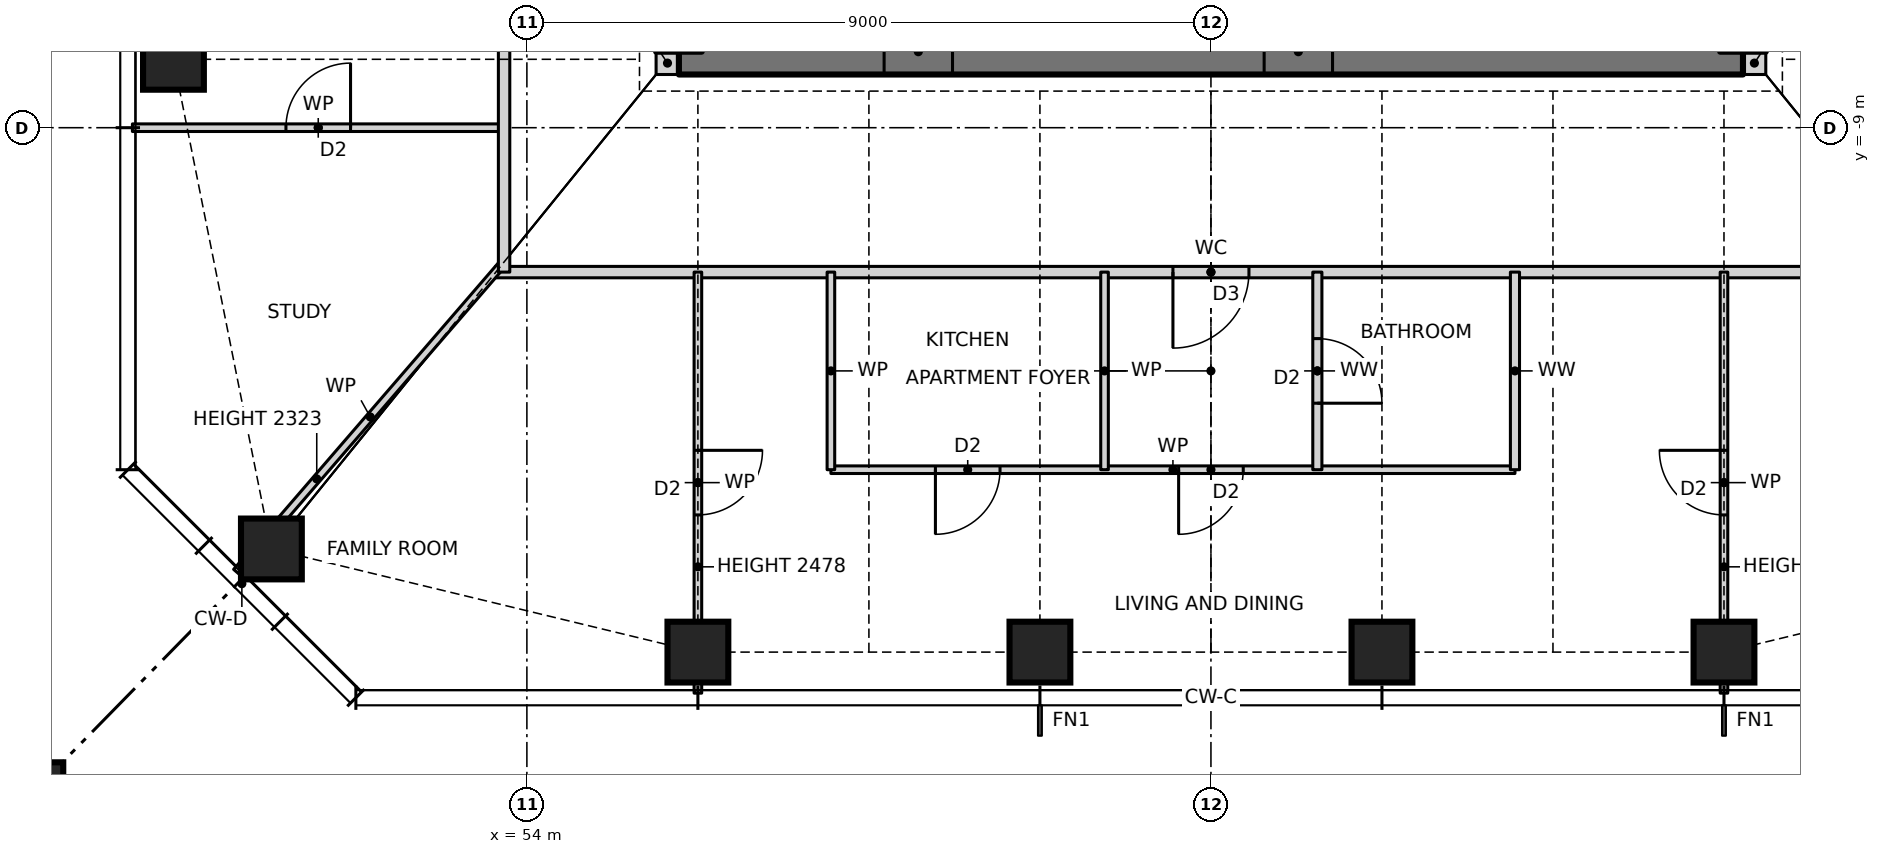
"""IFC4 building model, lengths in metres.
Left out: names, types, materials, properties, quantities, classifications, styles, units other than length and angle.
Written with IfcOpenShell. Run it as: python <this file> out.ifc"""

import sys

from ifc_helpers import new_model, si_unit, direction, frame, frame_2d, origin, origin_2d, place, context, subcontext, project, spatial, rectangle, hollow_rectangle, extrude, element, fill, save


model = new_model("IFC4")
c1 = context("Model", 3, precision=1e-05, world=origin(), true_north=direction((0.0, 1.0)))
c2 = subcontext(c1, "Body", "Model", "MODEL_VIEW")
j1 = project(units=[si_unit("LENGTHUNIT", "METRE"), si_unit("PLANEANGLEUNIT", "RADIAN")], contexts=[c1])
p1 = place(None, origin())
s1 = spatial("IfcSite", under=j1, at=p1, CompositionType="ELEMENT")
p2 = place(p1, origin())
s2 = spatial("IfcBuilding", under=s1, at=p2, CompositionType="ELEMENT")
p3 = place(p2, frame((0.0, 0.0, 126.0)))
s3 = spatial("IfcBuildingStorey", under=s2, at=p3, CompositionType="ELEMENT", Elevation=126.0)
for number, where, z_axis, x_axis in (
    (1, (50.639, -14.543, 0.0), (0.0, 0.0, 1.0), (1.0, 0.0, 0.0)),
    (2, (56.25, -15.9, 0.0), (0.0, 0.0, 1.0), (1.0, 0.0, 0.0)),
    (3, (60.75, -15.9, 0.0), (0.0, 0.0, 1.0), (1.0, 0.0, 0.0)),
    (4, (65.25, -15.9, 0.0), (0.0, 0.0, 1.0), (1.0, 0.0, 0.0)),
    (5, (69.75, -15.9, 0.0), (0.0, 0.0, 1.0), (1.0, 0.0, 0.0)),
    (6, (49.35, -8.1, 0.0), (0.0, 0.0, 1.0), (1.0, 0.0, 0.0)),
):
    element("IfcColumn", number, at=place(p3, frame(where, z_axis=z_axis, x_axis=x_axis)), inside=s3, PredefinedType="COLUMN", context=c2, shape_type="SweptSolid", body=[
        extrude(hollow_rectangle(XDim=0.8, YDim=0.8, WallThickness=0.1, at=origin_2d()), origin(), (0.0, 0.0, 1.0), 3.5),
    ])
p4 = place(p3, frame((47.35, -17.9, 0.0), z_axis=(0.0, 0.0, 1.0), x_axis=(1.0, 0.0, 0.0)))
e7 = element("IfcColumn", 7, at=p4, inside=s3, PredefinedType="COLUMN", context=c2, shape_type="SweptSolid", body=[
    extrude(hollow_rectangle(XDim=1.1, YDim=1.1, WallThickness=0.06, at=origin_2d()), origin(), (0.0, 0.0, 1.0), 3.5),
])
for number, where, z_axis, x_axis in (
    (8, (55.7, -8.15, 0.0), (0.0, 0.0, 1.0), (1.0, 0.0, 0.0)),
    (9, (70.0, -8.15, 0.0), (0.0, 0.0, 1.0), (1.0, 0.0, 0.0)),
):
    element("IfcWall", number, at=place(p3, frame(where, z_axis=z_axis, x_axis=x_axis)), inside=s3, PredefinedType="SOLIDWALL", context=c2, shape_type="SweptSolid", body=[
        extrude(rectangle(XDim=0.3, YDim=0.3, at=frame_2d((0.15, 0.0))), origin(), (0.0, 0.0, 1.0), 3.5),
    ])
p5 = place(p3, frame((56.0, -8.0, 0.0), z_axis=(0.0, 0.0, 1.0), x_axis=(1.0, 0.0, 0.0)))
e10 = element("IfcWall", 10, at=p5, inside=s3, PredefinedType="SHEAR", context=c2, shape_type="SweptSolid", body=[
    extrude(rectangle(XDim=14.0, YDim=0.6, at=frame_2d((7.0, 0.0))), origin(), (0.0, 0.0, 1.0), 3.5),
])
p6 = place(p5, frame((2.7, 0.0, 0.0)))
e11 = element("IfcOpeningElement", 11, at=p6, cuts=e10, PredefinedType="OPENING", context=c2, shape_type="SweptSolid", body=[
    extrude(rectangle(XDim=0.9, YDim=2.1, at=frame_2d((0.45, 1.05))), frame((0.0, 0.31, 0.0), z_axis=(0.0, -1.0, 0.0), x_axis=(1.0, 0.0, 0.0)), (0.0, 0.0, 1.0), 0.62),
])
p7 = place(p5, frame((7.7, 0.0, 0.0)))
e12 = element("IfcOpeningElement", 12, at=p7, cuts=e10, PredefinedType="OPENING", context=c2, shape_type="SweptSolid", body=[
    extrude(rectangle(XDim=0.9, YDim=2.1, at=frame_2d((0.45, 1.05))), frame((0.0, 0.31, 0.0), z_axis=(0.0, -1.0, 0.0), x_axis=(1.0, 0.0, 0.0)), (0.0, 0.0, 1.0), 0.62),
])
p8 = place(p3, frame((58.0, -13.5, 0.0), z_axis=(0.0, 0.0, 1.0), x_axis=(1.0, 0.0, 0.0)))
e13 = element("IfcWall", 13, at=p8, inside=s3, PredefinedType="PARTITIONING", context=c2, shape_type="SweptSolid", body=[
    extrude(rectangle(XDim=9.0, YDim=0.1, at=frame_2d((4.5, 0.0))), origin(), (0.0, 0.0, 1.0), 3.25),
])
p9 = place(p8, frame((1.375, 0.0, 0.0)))
e14 = element("IfcOpeningElement", 14, at=p9, cuts=e13, PredefinedType="OPENING", context=c2, shape_type="SweptSolid", body=[
    extrude(rectangle(XDim=0.85, YDim=2.1, at=frame_2d((0.425, 1.05))), frame((0.0, 0.06, 0.0), z_axis=(0.0, -1.0, 0.0), x_axis=(1.0, 0.0, 0.0)), (0.0, 0.0, 1.0), 0.12),
])
p10 = place(p8, frame((4.575, 0.0, 0.0)))
e15 = element("IfcOpeningElement", 15, at=p10, cuts=e13, PredefinedType="OPENING", context=c2, shape_type="SweptSolid", body=[
    extrude(rectangle(XDim=0.85, YDim=2.1, at=frame_2d((0.425, 1.05))), frame((0.0, 0.06, 0.0), z_axis=(0.0, -1.0, 0.0), x_axis=(1.0, 0.0, 0.0)), (0.0, 0.0, 1.0), 0.12),
])
p11 = place(p3, frame((53.586, -10.9, 0.0), z_axis=(0.0, 0.0, 1.0), x_axis=(1.0, 0.0, 0.0)))
e16 = element("IfcWall", 16, at=p11, inside=s3, PredefinedType="PARTITIONING", context=c2, shape_type="SweptSolid", body=[
    extrude(rectangle(XDim=18.828, YDim=0.15, at=frame_2d((9.414, 0.0))), origin(), (0.0, 0.0, 1.0), 3.25),
])
p12 = place(p11, frame((8.914, 0.0, 0.0)))
e17 = element("IfcOpeningElement", 17, at=p12, cuts=e16, PredefinedType="OPENING", context=c2, shape_type="SweptSolid", body=[
    extrude(rectangle(XDim=1.0, YDim=2.1, at=frame_2d((0.5, 1.05))), frame((0.0, 0.085, 0.0), z_axis=(0.0, -1.0, 0.0), x_axis=(1.0, 0.0, 0.0)), (0.0, 0.0, 1.0), 0.17),
])
p13 = place(p3, frame((48.81, -9.0, 0.0), z_axis=(0.0, 0.0, 1.0), x_axis=(1.0, 0.0, 0.0)))
e18 = element("IfcWall", 18, at=p13, inside=s3, PredefinedType="PARTITIONING", context=c2, shape_type="SweptSolid", body=[
    extrude(rectangle(XDim=4.89, YDim=0.1, at=frame_2d((2.445, 0.0))), origin(), (0.0, 0.0, 1.0), 3.25),
])
p14 = place(p13, frame((2.02, 0.0, 0.0)))
e19 = element("IfcOpeningElement", 19, at=p14, cuts=e18, PredefinedType="OPENING", context=c2, shape_type="SweptSolid", body=[
    extrude(rectangle(XDim=0.85, YDim=2.1, at=frame_2d((0.425, 1.05))), frame((0.0, 0.06, 0.0), z_axis=(0.0, -1.0, 0.0), x_axis=(1.0, 0.0, 0.0)), (0.0, 0.0, 1.0), 0.12),
])
p15 = place(p3, frame((50.179, -14.844, 0.0), z_axis=(0.0, 0.0, 1.0), x_axis=(0.653713095188, 0.756742485381, 0.0)))
e20 = element("IfcWall", 20, at=p15, inside=s3, PredefinedType="PARTITIONING", context=c2, shape_type="SweptSolid", body=[
    extrude(rectangle(XDim=5.386, YDim=0.1, at=frame_2d((2.693, 0.0))), origin(), (0.0, 0.0, 1.0), 2.323),
])
p16 = place(p3, frame((69.75, -16.44, 0.0), z_axis=(0.0, 0.0, 1.0), x_axis=(0.0, 1.0, 0.0)))
e21 = element("IfcWall", 21, at=p16, inside=s3, PredefinedType="PARTITIONING", context=c2, shape_type="SweptSolid", body=[
    extrude(rectangle(XDim=5.54, YDim=0.1, at=frame_2d((2.77, 0.0))), origin(), (0.0, 0.0, 1.0), 2.478),
])
p17 = place(p16, frame((2.345, 0.0, 0.0)))
e22 = element("IfcOpeningElement", 22, at=p17, cuts=e21, PredefinedType="OPENING", context=c2, shape_type="SweptSolid", body=[
    extrude(rectangle(XDim=0.85, YDim=2.1, at=frame_2d((0.425, 1.05))), frame((0.0, 0.06, 0.0), z_axis=(0.0, -1.0, 0.0), x_axis=(1.0, 0.0, 0.0)), (0.0, 0.0, 1.0), 0.12),
])
p18 = place(p3, frame((67.0, -13.5, 0.0), z_axis=(0.0, 0.0, 1.0), x_axis=(0.0, 1.0, 0.0)))
e23 = element("IfcWall", 23, at=p18, inside=s3, PredefinedType="PARTITIONING", context=c2, shape_type="SweptSolid", body=[
    extrude(rectangle(XDim=2.6, YDim=0.12, at=frame_2d((1.3, 0.0))), origin(), (0.0, 0.0, 1.0), 3.25),
])
p19 = place(p3, frame((64.4, -13.5, 0.0), z_axis=(0.0, 0.0, 1.0), x_axis=(0.0, 1.0, 0.0)))
e24 = element("IfcWall", 24, at=p19, inside=s3, PredefinedType="PARTITIONING", context=c2, shape_type="SweptSolid", body=[
    extrude(rectangle(XDim=2.6, YDim=0.12, at=frame_2d((1.3, 0.0))), origin(), (0.0, 0.0, 1.0), 3.25),
])
p20 = place(p19, frame((0.875, 0.0, 0.0)))
e25 = element("IfcOpeningElement", 25, at=p20, cuts=e24, PredefinedType="OPENING", context=c2, shape_type="SweptSolid", body=[
    extrude(rectangle(XDim=0.85, YDim=2.1, at=frame_2d((0.425, 1.05))), frame((0.0, 0.07, 0.0), z_axis=(0.0, -1.0, 0.0), x_axis=(1.0, 0.0, 0.0)), (0.0, 0.0, 1.0), 0.14),
])
for number, where, z_axis, x_axis in (
    (26, (61.6, -13.5, 0.0), (0.0, 0.0, 1.0), (0.0, 1.0, 0.0)),
    (27, (58.0, -13.5, 0.0), (0.0, 0.0, 1.0), (0.0, 1.0, 0.0)),
):
    element("IfcWall", number, at=place(p3, frame(where, z_axis=z_axis, x_axis=x_axis)), inside=s3, PredefinedType="PARTITIONING", context=c2, shape_type="SweptSolid", body=[
        extrude(rectangle(XDim=2.6, YDim=0.1, at=frame_2d((1.3, 0.0))), origin(), (0.0, 0.0, 1.0), 3.25),
    ])
p21 = place(p3, frame((56.25, -16.44, 0.0), z_axis=(0.0, 0.0, 1.0), x_axis=(0.0, 1.0, 0.0)))
e28 = element("IfcWall", 28, at=p21, inside=s3, PredefinedType="PARTITIONING", context=c2, shape_type="SweptSolid", body=[
    extrude(rectangle(XDim=5.54, YDim=0.1, at=frame_2d((2.77, 0.0))), origin(), (0.0, 0.0, 1.0), 2.478),
])
p22 = place(p21, frame((2.345, 0.0, 0.0)))
e29 = element("IfcOpeningElement", 29, at=p22, cuts=e28, PredefinedType="OPENING", context=c2, shape_type="SweptSolid", body=[
    extrude(rectangle(XDim=0.85, YDim=2.1, at=frame_2d((0.425, 1.05))), frame((0.0, 0.06, 0.0), z_axis=(0.0, -1.0, 0.0), x_axis=(1.0, 0.0, 0.0)), (0.0, 0.0, 1.0), 0.12),
])
p23 = place(p3, frame((53.7, -10.9, 0.0), z_axis=(0.0, 0.0, 1.0), x_axis=(0.0, 1.0, 0.0)))
e30 = element("IfcWall", 30, at=p23, inside=s3, PredefinedType="PARTITIONING", context=c2, shape_type="SweptSolid", body=[
    extrude(rectangle(XDim=21.668, YDim=0.15, at=frame_2d((10.834, 0.0))), origin(), (0.0, 0.0, 1.0), 3.25),
])
p24 = place(p23, frame((10.4, 0.0, 0.0)))
e31 = element("IfcOpeningElement", 31, at=p24, cuts=e30, PredefinedType="OPENING", context=c2, shape_type="SweptSolid", body=[
    extrude(rectangle(XDim=1.0, YDim=2.1, at=frame_2d((0.5, 1.05))), frame((0.0, 0.085, 0.0), z_axis=(0.0, -1.0, 0.0), x_axis=(1.0, 0.0, 0.0)), (0.0, 0.0, 1.0), 0.17),
])
p25 = place(p9, frame((0.85, 0.0, 0.0), z_axis=(0.0, 0.0, 1.0), x_axis=(-1.0, 0.0, 0.0)))
e32 = element("IfcDoor", 32, at=p25, inside=s3, OperationType="SINGLE_SWING_RIGHT", PredefinedType="DOOR", context=c2, shape_type="SweptSolid", body=[
    extrude(rectangle(XDim=0.85, YDim=2.1, at=frame_2d((0.425, 1.05))), frame((0.0, 0.025, 0.0), z_axis=(0.0, -1.0, 0.0), x_axis=(1.0, 0.0, 0.0)), (0.0, 0.0, 1.0), 0.05),
])
fill(e14, e32)
p26 = place(p12, frame((1.0, 0.0, 0.0), z_axis=(0.0, 0.0, 1.0), x_axis=(-1.0, 0.0, 0.0)))
e33 = element("IfcDoor", 33, at=p26, inside=s3, OperationType="SINGLE_SWING_RIGHT", PredefinedType="DOOR", context=c2, shape_type="SweptSolid", body=[
    extrude(rectangle(XDim=1.0, YDim=2.1, at=frame_2d((0.5, 1.05))), frame((0.0, 0.025, 0.0), z_axis=(0.0, -1.0, 0.0), x_axis=(1.0, 0.0, 0.0)), (0.0, 0.0, 1.0), 0.05),
])
fill(e17, e33)
p27 = place(p10, frame((0.85, 0.0, 0.0), z_axis=(0.0, 0.0, 1.0), x_axis=(-1.0, 0.0, 0.0)))
e34 = element("IfcDoor", 34, at=p27, inside=s3, OperationType="SINGLE_SWING_RIGHT", PredefinedType="DOOR", context=c2, shape_type="SweptSolid", body=[
    extrude(rectangle(XDim=0.85, YDim=2.1, at=frame_2d((0.425, 1.05))), frame((0.0, 0.025, 0.0), z_axis=(0.0, -1.0, 0.0), x_axis=(1.0, 0.0, 0.0)), (0.0, 0.0, 1.0), 0.05),
])
fill(e15, e34)
p28 = place(p20, frame((0.85, 0.0, 0.0), z_axis=(0.0, 0.0, 1.0), x_axis=(-1.0, 0.0, 0.0)))
e35 = element("IfcDoor", 35, at=p28, inside=s3, OperationType="SINGLE_SWING_RIGHT", PredefinedType="DOOR", context=c2, shape_type="SweptSolid", body=[
    extrude(rectangle(XDim=0.85, YDim=2.1, at=frame_2d((0.425, 1.05))), frame((0.0, 0.025, 0.0), z_axis=(0.0, -1.0, 0.0), x_axis=(1.0, 0.0, 0.0)), (0.0, 0.0, 1.0), 0.05),
])
fill(e25, e35)
p29 = place(p22, frame((0.85, 0.0, 0.0), z_axis=(0.0, 0.0, 1.0), x_axis=(-1.0, 0.0, 0.0)))
e36 = element("IfcDoor", 36, at=p29, inside=s3, OperationType="SINGLE_SWING_LEFT", PredefinedType="DOOR", context=c2, shape_type="SweptSolid", body=[
    extrude(rectangle(XDim=0.85, YDim=2.1, at=frame_2d((0.425, 1.05))), frame((0.0, 0.025, 0.0), z_axis=(0.0, -1.0, 0.0), x_axis=(1.0, 0.0, 0.0)), (0.0, 0.0, 1.0), 0.05),
])
fill(e29, e36)
p30 = place(p17, origin())
e37 = element("IfcDoor", 37, at=p30, inside=s3, OperationType="SINGLE_SWING_RIGHT", PredefinedType="DOOR", context=c2, shape_type="SweptSolid", body=[
    extrude(rectangle(XDim=0.85, YDim=2.1, at=frame_2d((0.425, 1.05))), frame((0.0, 0.025, 0.0), z_axis=(0.0, -1.0, 0.0), x_axis=(1.0, 0.0, 0.0)), (0.0, 0.0, 1.0), 0.05),
])
fill(e22, e37)
p31 = place(p14, origin())
e38 = element("IfcDoor", 38, at=p31, inside=s3, OperationType="SINGLE_SWING_RIGHT", PredefinedType="DOOR", context=c2, shape_type="SweptSolid", body=[
    extrude(rectangle(XDim=0.85, YDim=2.1, at=frame_2d((0.425, 1.05))), frame((0.0, 0.025, 0.0), z_axis=(0.0, -1.0, 0.0), x_axis=(1.0, 0.0, 0.0)), (0.0, 0.0, 1.0), 0.05),
])
fill(e19, e38)
p32 = place(p6, origin())
e39 = element("IfcDoor", 39, at=p32, inside=s3, OperationType="SINGLE_SWING_LEFT", PredefinedType="DOOR", context=c2, shape_type="SweptSolid", body=[
    extrude(rectangle(XDim=0.9, YDim=2.1, at=frame_2d((0.45, 1.05))), frame((0.0, 0.025, 0.0), z_axis=(0.0, -1.0, 0.0), x_axis=(1.0, 0.0, 0.0)), (0.0, 0.0, 1.0), 0.05),
])
fill(e11, e39)
p33 = place(p7, origin())
e40 = element("IfcDoor", 40, at=p33, inside=s3, OperationType="SINGLE_SWING_LEFT", PredefinedType="DOOR", context=c2, shape_type="SweptSolid", body=[
    extrude(rectangle(XDim=0.9, YDim=2.1, at=frame_2d((0.45, 1.05))), frame((0.0, 0.025, 0.0), z_axis=(0.0, -1.0, 0.0), x_axis=(1.0, 0.0, 0.0)), (0.0, 0.0, 1.0), 0.05),
])
fill(e12, e40)
save(model, sys.argv[1])
